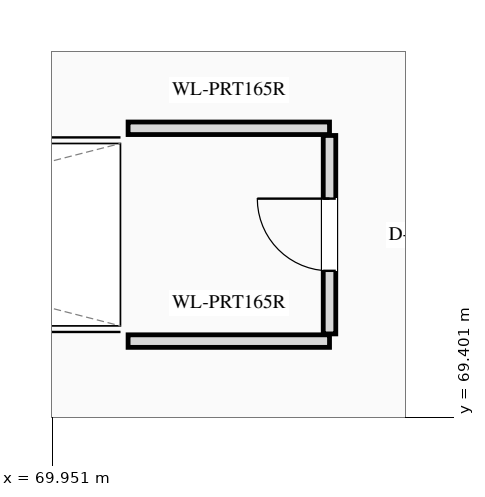
"""IFC4 building model, lengths in metres.
Left out: names, types, materials, properties, quantities, classifications, styles, units other than length and angle.
Written with IfcOpenShell. Run it as: python <this file> out.ifc"""

import sys

from ifc_helpers import new_model, si_unit, direction, frame, frame_2d, origin, place, context, subcontext, project, spatial, rectangle, extrude, element, fill, save


model = new_model("IFC4")
c1 = context("Model", 3, precision=1e-05, world=origin(), true_north=direction((0.0, 1.0)))
c2 = subcontext(c1, "Body", "Model", "MODEL_VIEW")
j1 = project(units=[si_unit("LENGTHUNIT", "METRE"), si_unit("PLANEANGLEUNIT", "RADIAN")], contexts=[c1])
p1 = place(None, origin())
s1 = spatial("IfcSite", under=j1, at=p1, CompositionType="ELEMENT")
p2 = place(p1, origin())
s2 = spatial("IfcBuilding", under=s1, at=p2, CompositionType="ELEMENT")
p3 = place(p2, frame((0.0, 0.0, 5.4)))
s3 = spatial("IfcBuildingStorey", under=s2, at=p3, CompositionType="ELEMENT", Elevation=5.4)
for number, where, z_axis, x_axis in (
    (1, (70.95, 70.4, 0.0), (0.0, 0.0, 1.0), (1.0, 0.0, 0.0)),
    (2, (70.95, 73.2, 0.0), (0.0, 0.0, 1.0), (1.0, 0.0, 0.0)),
):
    element("IfcWall", number, at=place(p3, frame(where, z_axis=z_axis, x_axis=x_axis)), inside=s3, PredefinedType="PARTITIONING", context=c2, shape_type="SweptSolid", body=[
        extrude(rectangle(XDim=2.65, YDim=0.165, at=frame_2d((1.325, 0.0))), origin(), (0.0, 0.0, 1.0), 5.095),
    ])
p4 = place(p3, frame((73.6, 70.494, 0.0), z_axis=(0.0, 0.0, 1.0), x_axis=(0.0, 1.0, 0.0)))
e3 = element("IfcWall", 3, at=p4, inside=s3, PredefinedType="PARTITIONING", context=c2, shape_type="SweptSolid", body=[
    extrude(rectangle(XDim=2.611, YDim=0.165, at=frame_2d((1.306, 0.0))), origin(), (0.0, 0.0, 1.0), 5.095),
])
p5 = place(p4, frame((0.83, 0.0, 0.0)))
e4 = element("IfcOpeningElement", 4, at=p5, cuts=e3, PredefinedType="OPENING", context=c2, shape_type="SweptSolid", body=[
    extrude(rectangle(XDim=0.95, YDim=2.15, at=frame_2d((0.475, 1.075))), frame((0.0, 0.093, 0.0), z_axis=(0.0, -1.0, 0.0), x_axis=(1.0, 0.0, 0.0)), (0.0, 0.0, 1.0), 0.185),
])
p6 = place(p5, origin())
e5 = element("IfcDoor", 5, at=p6, inside=s3, OperationType="SINGLE_SWING_RIGHT", PredefinedType="DOOR", context=c2, shape_type="SweptSolid", body=[
    extrude(rectangle(XDim=0.95, YDim=2.15, at=frame_2d((0.475, 1.075))), frame((0.0, 0.025, 0.0), z_axis=(0.0, -1.0, 0.0), x_axis=(1.0, 0.0, 0.0)), (0.0, 0.0, 1.0), 0.05),
])
fill(e4, e5)
save(model, sys.argv[1])
